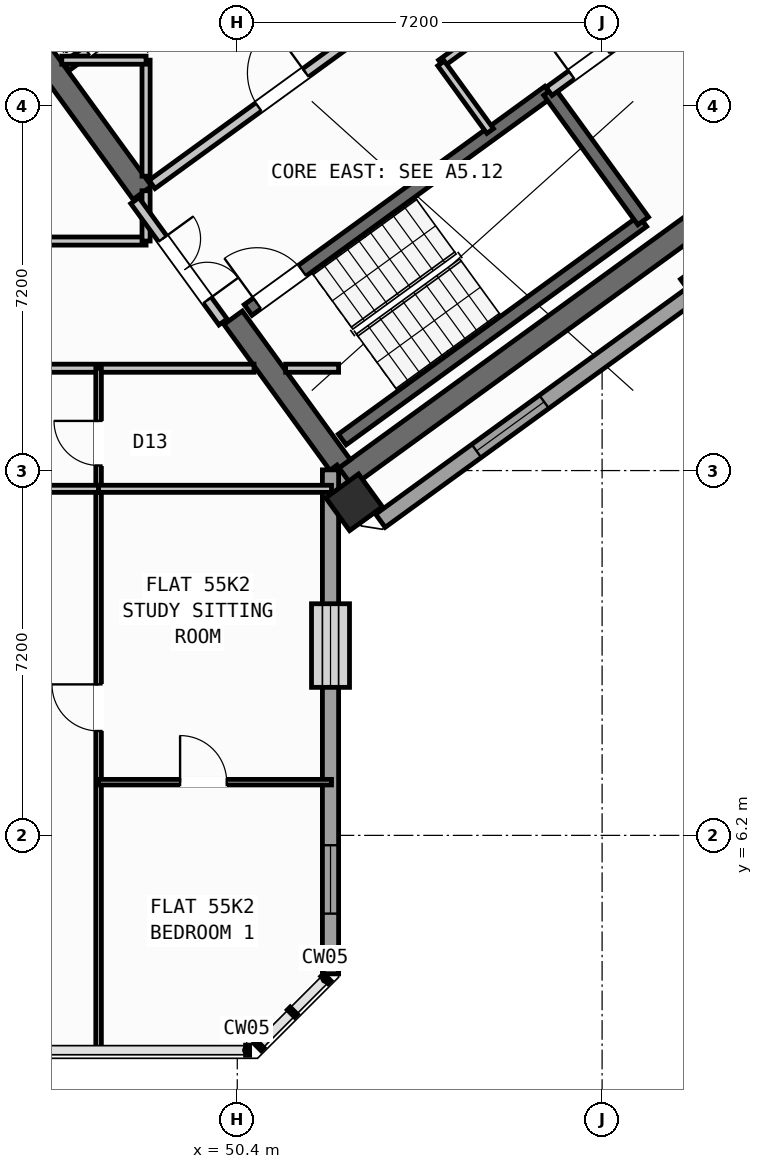
"""IFC4 building model, lengths in metres.
Left out: names, types, materials, properties, quantities, classifications, styles, units other than length and angle.
Written with IfcOpenShell. Run it as: python <this file> out.ifc"""

import sys

from ifc_helpers import new_model, si_unit, direction, frame, frame_2d, origin, origin_2d, place, context, subcontext, project, spatial, rectangle, hollow_rectangle, extrude, source, transform, mapped, element, fill, save


model = new_model("IFC4")
c1 = context("Model", 3, precision=1e-05, world=origin(), true_north=direction((0.0, 1.0)))
c2 = subcontext(c1, "Body", "Model", "MODEL_VIEW")
j1 = project(units=[si_unit("LENGTHUNIT", "METRE"), si_unit("PLANEANGLEUNIT", "RADIAN")], contexts=[c1])
p1 = place(None, origin())
s1 = spatial("IfcSite", under=j1, at=p1, CompositionType="ELEMENT")
p2 = place(p1, origin())
s2 = spatial("IfcBuilding", under=s1, at=p2, CompositionType="ELEMENT")
p3 = place(p2, frame((0.0, 0.0, 218.4)))
s3 = spatial("IfcBuildingStorey", under=s2, at=p3, CompositionType="ELEMENT", Elevation=218.4)
p4 = place(p3, frame((52.399, 13.169, 0.0), z_axis=(0.0, 0.0, 1.0), x_axis=(0.809022352778, 0.587777877013, 0.0)))
e1 = element("IfcWall", 1, at=p4, inside=s3, PredefinedType="SHEAR", context=c2, shape_type="SweptSolid", body=[
    extrude(rectangle(XDim=12.24, YDim=0.45, at=frame_2d((6.12, 0.0))), origin(), (0.0, 0.0, 1.0), 3.35),
])
p5 = place(p3, frame((52.449, 13.483, 0.0), z_axis=(0.0, 0.0, 1.0), x_axis=(-0.587819244441, 0.808992296542, 0.0)))
e2 = element("IfcWall", 2, at=p5, inside=s3, PredefinedType="SHEAR", context=c2, shape_type="SweptSolid", body=[
    extrude(rectangle(XDim=3.625, YDim=0.45, at=frame_2d((1.812, 0.0))), origin(), (0.0, 0.0, 1.0), 3.35),
])
p6 = place(p3, frame((48.526, 18.884, 0.0), z_axis=(0.0, 0.0, 1.0), x_axis=(-0.587774812919, 0.809024578921, 0.0)))
e3 = element("IfcWall", 3, at=p6, inside=s3, PredefinedType="SHEAR", context=c2, shape_type="SweptSolid", body=[
    extrude(rectangle(XDim=6.475, YDim=0.45, at=frame_2d((3.238, 0.0))), origin(), (0.0, 0.0, 1.0), 3.35),
])
m1 = source(origin(), c2, "Body", "SweptSolid", [
    extrude(hollow_rectangle(XDim=0.8, YDim=0.8, WallThickness=0.032, at=origin_2d()), origin(), (0.0, 0.0, 1.0), 3.6),
])
p7 = place(p3, frame((52.705, 12.773, 0.0), z_axis=(0.0, 0.0, 1.0), x_axis=(0.809016994375, 0.587785252292, 0.0)))
e4 = element("IfcColumn", 4, at=p7, inside=s3, PredefinedType="COLUMN", context=c2, shape_type="MappedRepresentation", body=[
    mapped(m1, transform((0.0, 0.0, 0.0), scale=1.0)),
])
p8 = place(p3, frame((67.454, 22.747, 0.0), z_axis=(0.0, 0.0, 1.0), x_axis=(-0.809021120468, -0.587779573171, 0.0)))
e5 = element("IfcWall", 5, at=p8, inside=s3, PredefinedType="STANDARD", context=c2, shape_type="SweptSolid", body=[
    extrude(rectangle(XDim=17.588, YDim=0.32, at=frame_2d((8.794, 0.0))), origin(), (0.0, 0.0, 1.0), 3.35),
])
p9 = place(p8, frame((1.624, 0.0, 0.0)))
e6 = element("IfcOpeningElement", 6, at=p9, cuts=e5, PredefinedType="OPENING", context=c2, shape_type="SweptSolid", body=[
    extrude(rectangle(XDim=1.05, YDim=2.15, at=frame_2d((0.525, 1.075))), frame((0.0, 0.17, 0.0), z_axis=(0.0, -1.0, 0.0), x_axis=(1.0, 0.0, 0.0)), (0.0, 0.0, 1.0), 0.34),
])
p10 = place(p8, frame((8.344, 0.0, 0.9)))
e7 = element("IfcOpeningElement", 7, at=p10, cuts=e5, PredefinedType="OPENING", context=c2, shape_type="SweptSolid", body=[
    extrude(rectangle(XDim=1.65, YDim=1.45, at=frame_2d((0.825, 0.725))), frame((0.0, 0.17, 0.0), z_axis=(0.0, -1.0, 0.0), x_axis=(1.0, 0.0, 0.0)), (0.0, 0.0, 1.0), 0.34),
])
p11 = place(p8, frame((13.594, 0.0, 0.9)))
e8 = element("IfcOpeningElement", 8, at=p11, cuts=e5, PredefinedType="OPENING", context=c2, shape_type="SweptSolid", body=[
    extrude(rectangle(XDim=1.65, YDim=1.45, at=frame_2d((0.825, 0.725))), frame((0.0, 0.17, 0.0), z_axis=(0.0, -1.0, 0.0), x_axis=(1.0, 0.0, 0.0)), (0.0, 0.0, 1.0), 0.34),
])
p12 = place(p3, frame((52.937, 12.455, 0.0), z_axis=(0.0, 0.0, 1.0), x_axis=(-0.587706324018, 0.809074333241, 0.0)))
e9 = element("IfcWall", 9, at=p12, inside=s3, PredefinedType="STANDARD", context=c2, shape_type="SweptSolid", body=[
    extrude(rectangle(XDim=1.186, YDim=0.32, at=frame_2d((0.593, 0.0))), origin(), (0.0, 0.0, 1.0), 3.35),
])
p13 = place(p3, frame((52.24, 13.414, 0.0), z_axis=(0.0, 0.0, 1.0), x_axis=(0.0, -1.0, 0.0)))
e10 = element("IfcWall", 10, at=p13, inside=s3, PredefinedType="STANDARD", context=c2, shape_type="SweptSolid", body=[
    extrude(rectangle(XDim=9.948, YDim=0.32, at=frame_2d((4.974, 0.0))), origin(), (0.0, 0.0, 1.0), 3.35),
])
p14 = place(p13, frame((2.643, 0.0, 0.9)))
e11 = element("IfcOpeningElement", 11, at=p14, cuts=e10, PredefinedType="OPENING", context=c2, shape_type="SweptSolid", body=[
    extrude(rectangle(XDim=1.65, YDim=1.45, at=frame_2d((0.825, 0.725))), frame((0.0, 0.17, 0.0), z_axis=(0.0, -1.0, 0.0), x_axis=(1.0, 0.0, 0.0)), (0.0, 0.0, 1.0), 0.34),
])
p15 = place(p13, frame((7.408, 0.0, 0.9)))
e12 = element("IfcOpeningElement", 12, at=p15, cuts=e10, PredefinedType="OPENING", context=c2, shape_type="SweptSolid", body=[
    extrude(rectangle(XDim=1.35, YDim=1.45, at=frame_2d((0.675, 0.725))), frame((0.0, 0.17, 0.0), z_axis=(0.0, -1.0, 0.0), x_axis=(1.0, 0.0, 0.0)), (0.0, 0.0, 1.0), 0.34),
])
p16 = place(p3, frame((52.472, 14.013, 0.0), z_axis=(0.0, 0.0, 1.0), x_axis=(0.809028366311, 0.587769599847, 0.0)))
e13 = element("IfcWall", 13, at=p16, inside=s3, PredefinedType="SHEAR", context=c2, shape_type="SweptSolid", body=[
    extrude(rectangle(XDim=7.33, YDim=0.26, at=frame_2d((3.665, 0.0))), origin(), (0.0, 0.0, 1.0), 3.35),
])
p17 = place(p3, frame((50.615, 16.57, 0.0), z_axis=(0.0, 0.0, 1.0), x_axis=(0.809028366311, 0.587769599847, 0.0)))
e14 = element("IfcWall", 14, at=p17, inside=s3, PredefinedType="SHEAR", context=c2, shape_type="SweptSolid", body=[
    extrude(rectangle(XDim=7.33, YDim=0.26, at=frame_2d((3.665, 0.0))), origin(), (0.0, 0.0, 1.0), 3.35),
])
p18 = place(p17, frame((0.22, 0.0, 0.0)))
e15 = element("IfcOpeningElement", 15, at=p18, cuts=e14, PredefinedType="OPENING", context=c2, shape_type="SweptSolid", body=[
    extrude(rectangle(XDim=1.1, YDim=2.1, at=frame_2d((0.55, 1.05))), frame((0.0, 0.14, 0.0), z_axis=(0.0, -1.0, 0.0), x_axis=(1.0, 0.0, 0.0)), (0.0, 0.0, 1.0), 0.28),
])
p19 = place(p3, frame((58.41, 18.327, 0.0), z_axis=(0.0, 0.0, 1.0), x_axis=(-0.58776738483, 0.809029975545, 0.0)))
e16 = element("IfcWall", 16, at=p19, inside=s3, PredefinedType="SHEAR", context=c2, shape_type="SweptSolid", body=[
    extrude(rectangle(XDim=3.16, YDim=0.26, at=frame_2d((1.58, 0.0))), origin(), (0.0, 0.0, 1.0), 3.35),
])
p20 = place(p3, frame((47.025, 21.378, 0.0), z_axis=(0.0, 0.0, 1.0), x_axis=(0.809052869724, 0.587735870941, 0.0)))
e17 = element("IfcWall", 17, at=p20, inside=s3, PredefinedType="STANDARD", context=c2, shape_type="SweptSolid", body=[
    extrude(rectangle(XDim=3.498, YDim=0.2, at=frame_2d((1.749, 0.0))), origin(), (0.0, 0.0, 1.0), 3.34),
])
p21 = place(p20, frame((0.508, 0.0, 0.0)))
e18 = element("IfcOpeningElement", 18, at=p21, cuts=e17, PredefinedType="OPENING", context=c2, shape_type="SweptSolid", body=[
    extrude(rectangle(XDim=1.3, YDim=2.2, at=frame_2d((0.65, 1.1))), frame((0.0, 0.11, 0.0), z_axis=(0.0, -1.0, 0.0), x_axis=(1.0, 0.0, 0.0)), (0.0, 0.0, 1.0), 0.22),
])
p22 = place(p3, frame((48.718, 19.048, 0.0), z_axis=(0.0, 0.0, 1.0), x_axis=(0.809017261719, 0.587784884325, 0.0)))
e19 = element("IfcWall", 19, at=p22, inside=s3, PredefinedType="STANDARD", context=c2, shape_type="SweptSolid", body=[
    extrude(rectangle(XDim=5.818, YDim=0.2, at=frame_2d((2.909, 0.0))), origin(), (0.0, 0.0, 1.0), 3.34),
])
p23 = place(p22, frame((2.598, 0.0, 0.0)))
e20 = element("IfcOpeningElement", 20, at=p23, cuts=e19, PredefinedType="OPENING", context=c2, shape_type="SweptSolid", body=[
    extrude(rectangle(XDim=1.15, YDim=2.1, at=frame_2d((0.575, 1.05))), frame((0.0, 0.11, 0.0), z_axis=(0.0, -1.0, 0.0), x_axis=(1.0, 0.0, 0.0)), (0.0, 0.0, 1.0), 0.22),
])
p24 = place(p3, frame((56.553, 20.884, 0.0), z_axis=(0.0, 0.0, 1.0), x_axis=(0.809041669066, 0.587751288995, 0.0)))
e21 = element("IfcWall", 21, at=p24, inside=s3, PredefinedType="STANDARD", context=c2, shape_type="SweptSolid", body=[
    extrude(rectangle(XDim=3.868, YDim=0.2, at=frame_2d((1.934, 0.0))), origin(), (0.0, 0.0, 1.0), 3.34),
])
p25 = place(p24, frame((0.55, 0.0, 0.0)))
e22 = element("IfcOpeningElement", 22, at=p25, cuts=e21, PredefinedType="OPENING", context=c2, shape_type="SweptSolid", body=[
    extrude(rectangle(XDim=0.86, YDim=2.05, at=frame_2d((0.43, 1.025))), frame((0.0, 0.11, 0.0), z_axis=(0.0, -1.0, 0.0), x_axis=(1.0, 0.0, 0.0)), (0.0, 0.0, 1.0), 0.22),
])
p26 = place(p3, frame((54.421, 21.436, 0.0), z_axis=(0.0, 0.0, 1.0), x_axis=(0.809013710463, 0.587789772183, 0.0)))
e23 = element("IfcWall", 23, at=p26, inside=s3, PredefinedType="PARTITIONING", context=c2, shape_type="SweptSolid", body=[
    extrude(rectangle(XDim=5.36, YDim=0.16, at=frame_2d((2.68, 0.0))), origin(), (0.0, 0.0, 1.0), 3.34),
])
p27 = place(p26, frame((1.4, 0.0, 0.0)))
e24 = element("IfcOpeningElement", 24, at=p27, cuts=e23, PredefinedType="OPENING", context=c2, shape_type="SweptSolid", body=[
    extrude(rectangle(XDim=0.86, YDim=2.05, at=frame_2d((0.43, 1.025))), frame((0.0, 0.09, 0.0), z_axis=(0.0, -1.0, 0.0), x_axis=(1.0, 0.0, 0.0)), (0.0, 0.0, 1.0), 0.18),
])
p28 = place(p3, frame((55.391, 20.102, 0.0), z_axis=(0.0, 0.0, 1.0), x_axis=(-0.58778447739, 0.809017557374, 0.0)))
e25 = element("IfcWall", 25, at=p28, inside=s3, PredefinedType="PARTITIONING", context=c2, shape_type="SweptSolid", body=[
    extrude(rectangle(XDim=1.65, YDim=0.16, at=frame_2d((0.825, 0.0))), origin(), (0.0, 0.0, 1.0), 3.34),
])
p29 = place(p3, frame((35.178, 15.42, 0.0), z_axis=(0.0, 0.0, 1.0), x_axis=(1.0, 0.0, 0.0)))
e26 = element("IfcWall", 26, at=p29, inside=s3, PredefinedType="PARTITIONING", context=c2, shape_type="SweptSolid", body=[
    extrude(rectangle(XDim=15.552, YDim=0.16, at=frame_2d((7.776, 0.0))), origin(), (0.0, 0.0, 1.0), 3.34),
])
p30 = place(p29, frame((0.733, 0.0, 0.0)))
e27 = element("IfcOpeningElement", 27, at=p30, cuts=e26, PredefinedType="OPENING", context=c2, shape_type="SweptSolid", body=[
    extrude(rectangle(XDim=1.0, YDim=2.1, at=frame_2d((0.5, 1.05))), frame((0.0, 0.09, 0.0), z_axis=(0.0, -1.0, 0.0), x_axis=(1.0, 0.0, 0.0)), (0.0, 0.0, 1.0), 0.18),
])
p31 = place(p29, frame((9.153, 0.0, 0.0)))
e28 = element("IfcOpeningElement", 28, at=p31, cuts=e26, PredefinedType="OPENING", context=c2, shape_type="SweptSolid", body=[
    extrude(rectangle(XDim=1.0, YDim=2.1, at=frame_2d((0.5, 1.05))), frame((0.0, 0.09, 0.0), z_axis=(0.0, -1.0, 0.0), x_axis=(1.0, 0.0, 0.0)), (0.0, 0.0, 1.0), 0.18),
])
p32 = place(p3, frame((51.354, 15.42, 0.0), z_axis=(0.0, 0.0, 1.0), x_axis=(1.0, 0.0, 0.0)))
e29 = element("IfcWall", 29, at=p32, inside=s3, PredefinedType="PARTITIONING", context=c2, shape_type="SweptSolid", body=[
    extrude(rectangle(XDim=1.046, YDim=0.16, at=frame_2d((0.523, 0.0))), origin(), (0.0, 0.0, 1.0), 3.34),
])
p33 = place(p3, frame((38.65, 17.93, 0.0), z_axis=(0.0, 0.0, 1.0), x_axis=(1.0, 0.0, 0.0)))
e30 = element("IfcWall", 30, at=p33, inside=s3, PredefinedType="PARTITIONING", context=c2, shape_type="SweptSolid", body=[
    extrude(rectangle(XDim=9.95, YDim=0.16, at=frame_2d((4.975, 0.0))), origin(), (0.0, 0.0, 1.0), 3.34),
])
p34 = place(p33, frame((4.475, 0.0, 0.0)))
e31 = element("IfcOpeningElement", 31, at=p34, cuts=e30, PredefinedType="OPENING", context=c2, shape_type="SweptSolid", body=[
    extrude(rectangle(XDim=1.0, YDim=2.1, at=frame_2d((0.5, 1.05))), frame((0.0, 0.09, 0.0), z_axis=(0.0, -1.0, 0.0), x_axis=(1.0, 0.0, 0.0)), (0.0, 0.0, 1.0), 0.18),
])
p35 = place(p3, frame((48.6, 17.93, 0.0), z_axis=(0.0, 0.0, 1.0), x_axis=(0.0, 1.0, 0.0)))
e32 = element("IfcWall", 32, at=p35, inside=s3, PredefinedType="PARTITIONING", context=c2, shape_type="SweptSolid", body=[
    extrude(rectangle(XDim=0.993, YDim=0.16, at=frame_2d((0.496, 0.0))), origin(), (0.0, 0.0, 1.0), 3.34),
])
p36 = place(p3, frame((48.6, 19.21, 0.0), z_axis=(0.0, 0.0, 1.0), x_axis=(0.0, 1.0, 0.0)))
e33 = element("IfcWall", 33, at=p36, inside=s3, PredefinedType="PARTITIONING", context=c2, shape_type="SweptSolid", body=[
    extrude(rectangle(XDim=2.29, YDim=0.16, at=frame_2d((1.145, 0.0))), origin(), (0.0, 0.0, 1.0), 3.34),
])
p37 = place(p3, frame((46.936, 21.5, 0.0), z_axis=(0.0, 0.0, 1.0), x_axis=(1.0, 0.0, 0.0)))
e34 = element("IfcWall", 34, at=p37, inside=s3, PredefinedType="PARTITIONING", context=c2, shape_type="SweptSolid", body=[
    extrude(rectangle(XDim=1.664, YDim=0.16, at=frame_2d((0.832, 0.0))), origin(), (0.0, 0.0, 1.0), 3.34),
])
p38 = place(p3, frame((50.119, 16.333, 0.0), z_axis=(0.0, 0.0, 1.0), x_axis=(-0.587749856981, 0.809042709391, 0.0)))
e35 = element("IfcWall", 35, at=p38, inside=s3, PredefinedType="STANDARD", context=c2, shape_type="SweptSolid", body=[
    extrude(rectangle(XDim=2.96, YDim=0.2, at=frame_2d((1.48, 0.0))), origin(), (0.0, 0.0, 1.0), 3.34),
])
p39 = place(p38, frame((0.53, 0.0, 0.0)))
e36 = element("IfcOpeningElement", 36, at=p39, cuts=e35, PredefinedType="OPENING", context=c2, shape_type="SweptSolid", body=[
    extrude(rectangle(XDim=1.5, YDim=2.15, at=frame_2d((0.75, 1.075))), frame((0.0, 0.11, 0.0), z_axis=(0.0, -1.0, 0.0), x_axis=(1.0, 0.0, 0.0)), (0.0, 0.0, 1.0), 0.22),
])
p40 = place(p3, frame((47.663, 1.96, 0.0), z_axis=(0.0, 0.0, 1.0), x_axis=(0.0, 1.0, 0.0)))
e37 = element("IfcWall", 37, at=p40, inside=s3, PredefinedType="PARTITIONING", context=c2, shape_type="SweptSolid", body=[
    extrude(rectangle(XDim=13.46, YDim=0.11, at=frame_2d((6.73, 0.0))), origin(), (0.0, 0.0, 1.0), 3.34),
])
p41 = place(p40, frame((6.3, 0.0, 0.0)))
e38 = element("IfcOpeningElement", 38, at=p41, cuts=e37, PredefinedType="OPENING", context=c2, shape_type="SweptSolid", body=[
    extrude(rectangle(XDim=0.92, YDim=2.08, at=frame_2d((0.46, 1.04))), frame((0.0, 0.065, 0.0), z_axis=(0.0, -1.0, 0.0), x_axis=(1.0, 0.0, 0.0)), (0.0, 0.0, 1.0), 0.13),
])
p42 = place(p40, frame((11.54, 0.0, 0.0)))
e39 = element("IfcOpeningElement", 39, at=p42, cuts=e37, PredefinedType="OPENING", context=c2, shape_type="SweptSolid", body=[
    extrude(rectangle(XDim=0.88, YDim=2.08, at=frame_2d((0.44, 1.04))), frame((0.0, 0.065, 0.0), z_axis=(0.0, -1.0, 0.0), x_axis=(1.0, 0.0, 0.0)), (0.0, 0.0, 1.0), 0.13),
])
p43 = place(p3, frame((41.95, 13.04, 0.0), z_axis=(0.0, 0.0, 1.0), x_axis=(1.0, 0.0, 0.0)))
e40 = element("IfcWall", 40, at=p43, inside=s3, PredefinedType="PLUMBINGWALL", context=c2, shape_type="SweptSolid", body=[
    extrude(rectangle(XDim=5.713, YDim=0.14, at=frame_2d((2.856, 0.0))), origin(), (0.0, 0.0, 1.0), 3.34),
])
p44 = place(p43, frame((2.396, 0.0, 0.0)))
e41 = element("IfcOpeningElement", 41, at=p44, cuts=e40, PredefinedType="OPENING", context=c2, shape_type="SweptSolid", body=[
    extrude(rectangle(XDim=0.92, YDim=2.08, at=frame_2d((0.46, 1.04))), frame((0.0, 0.08, 0.0), z_axis=(0.0, -1.0, 0.0), x_axis=(1.0, 0.0, 0.0)), (0.0, 0.0, 1.0), 0.16),
])
p45 = place(p3, frame((47.663, 13.04, 0.0), z_axis=(0.0, 0.0, 1.0), x_axis=(1.0, 0.0, 0.0)))
e42 = element("IfcWall", 42, at=p45, inside=s3, PredefinedType="PLUMBINGWALL", context=c2, shape_type="SweptSolid", body=[
    extrude(rectangle(XDim=4.597, YDim=0.14, at=frame_2d((2.298, 0.0))), origin(), (0.0, 0.0, 1.0), 2.525),
])
p46 = place(p3, frame((47.663, 7.25, 0.0), z_axis=(0.0, 0.0, 1.0), x_axis=(1.0, 0.0, 0.0)))
e43 = element("IfcWall", 43, at=p46, inside=s3, PredefinedType="PARTITIONING", context=c2, shape_type="SweptSolid", body=[
    extrude(rectangle(XDim=4.597, YDim=0.11, at=frame_2d((2.298, 0.0))), origin(), (0.0, 0.0, 1.0), 3.34),
])
p47 = place(p46, frame((1.608, 0.0, 0.0)))
e44 = element("IfcOpeningElement", 44, at=p47, cuts=e43, PredefinedType="OPENING", context=c2, shape_type="SweptSolid", body=[
    extrude(rectangle(XDim=0.92, YDim=2.08, at=frame_2d((0.46, 1.04))), frame((0.0, 0.065, 0.0), z_axis=(0.0, -1.0, 0.0), x_axis=(1.0, 0.0, 0.0)), (0.0, 0.0, 1.0), 0.13),
])
p48 = place(p3, frame((64.709, 20.938, 0.0), z_axis=(0.0, 0.0, 1.0), x_axis=(-0.587781191743, 0.809019944521, 0.0)))
e45 = element("IfcWall", 45, at=p48, inside=s3, PredefinedType="PARTITIONING", context=c2, shape_type="SweptSolid", body=[
    extrude(rectangle(XDim=11.6, YDim=0.16, at=frame_2d((5.8, 0.0))), origin(), (0.0, 0.0, 1.0), 3.34),
])
m2 = source(origin(), c2, "Body", "SweptSolid", [
    extrude(rectangle(XDim=1.65, YDim=1.45, at=frame_2d((0.825, 0.725))), frame((0.0, 0.03, 0.0), z_axis=(0.0, -1.0, 0.0), x_axis=(1.0, 0.0, 0.0)), (0.0, 0.0, 1.0), 0.06),
])
p49 = place(p11, origin())
e46 = element("IfcWindow", 46, at=p49, inside=s3, PartitioningType="SINGLE_PANEL", PredefinedType="WINDOW", context=c2, shape_type="MappedRepresentation", body=[
    mapped(m2, transform((0.0, 0.0, 0.0), scale=1.0)),
])
fill(e8, e46)
p50 = place(p14, origin())
e47 = element("IfcWindow", 47, at=p50, inside=s3, PartitioningType="SINGLE_PANEL", PredefinedType="WINDOW", context=c2, shape_type="MappedRepresentation", body=[
    mapped(m2, transform((0.0, 0.0, 0.0), scale=1.0)),
])
fill(e11, e47)
m3 = source(origin(), c2, "Body", "SweptSolid", [
    extrude(rectangle(XDim=1.35, YDim=1.45, at=frame_2d((0.675, 0.725))), frame((0.0, 0.03, 0.0), z_axis=(0.0, -1.0, 0.0), x_axis=(1.0, 0.0, 0.0)), (0.0, 0.0, 1.0), 0.06),
])
p51 = place(p15, origin())
e48 = element("IfcWindow", 48, at=p51, inside=s3, PartitioningType="SINGLE_PANEL", PredefinedType="WINDOW", context=c2, shape_type="MappedRepresentation", body=[
    mapped(m3, transform((0.0, 0.0, 0.0), scale=1.0)),
])
fill(e12, e48)
m4 = source(origin(), c2, "Body", "SweptSolid", [
    extrude(rectangle(XDim=1.1, YDim=2.1, at=frame_2d((0.55, 1.05))), frame((0.0, 0.025, 0.0), z_axis=(0.0, -1.0, 0.0), x_axis=(1.0, 0.0, 0.0)), (0.0, 0.0, 1.0), 0.05),
])
p52 = place(p18, origin())
e49 = element("IfcDoor", 49, at=p52, inside=s3, OperationType="SINGLE_SWING_LEFT", PredefinedType="DOOR", context=c2, shape_type="MappedRepresentation", body=[
    mapped(m4, transform((0.0, 0.0, 0.0), scale=1.0)),
])
fill(e15, e49)
m5 = source(origin(), c2, "Body", "SweptSolid", [
    extrude(rectangle(XDim=1.15, YDim=2.1, at=frame_2d((0.575, 1.05))), frame((0.0, 0.025, 0.0), z_axis=(0.0, -1.0, 0.0), x_axis=(1.0, 0.0, 0.0)), (0.0, 0.0, 1.0), 0.05),
])
p53 = place(p23, origin())
e50 = element("IfcDoor", 50, at=p53, inside=s3, OperationType="SINGLE_SWING_RIGHT", PredefinedType="DOOR", context=c2, shape_type="MappedRepresentation", body=[
    mapped(m5, transform((0.0, 0.0, 0.0), scale=1.0)),
])
fill(e20, e50)
m6 = source(origin(), c2, "Body", "SweptSolid", [
    extrude(rectangle(XDim=1.3, YDim=2.2, at=frame_2d((0.65, 1.1))), frame((0.0, 0.025, 0.0), z_axis=(0.0, -1.0, 0.0), x_axis=(1.0, 0.0, 0.0)), (0.0, 0.0, 1.0), 0.05),
])
p54 = place(p21, origin())
e51 = element("IfcDoor", 51, at=p54, inside=s3, OperationType="DOUBLE_DOOR_SLIDING", PredefinedType="DOOR", context=c2, shape_type="MappedRepresentation", body=[
    mapped(m6, transform((0.0, 0.0, 0.0), scale=1.0)),
])
fill(e18, e51)
m7 = source(origin(), c2, "Body", "SweptSolid", [
    extrude(rectangle(XDim=0.86, YDim=2.05, at=frame_2d((0.43, 1.025))), frame((0.0, 0.025, 0.0), z_axis=(0.0, -1.0, 0.0), x_axis=(1.0, 0.0, 0.0)), (0.0, 0.0, 1.0), 0.05),
])
p55 = place(p25, origin())
e52 = element("IfcDoor", 52, at=p55, inside=s3, OperationType="SINGLE_SWING_LEFT", PredefinedType="DOOR", context=c2, shape_type="MappedRepresentation", body=[
    mapped(m7, transform((0.0, 0.0, 0.0), scale=1.0)),
])
fill(e22, e52)
m8 = source(origin(), c2, "Body", "SweptSolid", [
    extrude(rectangle(XDim=1.5, YDim=2.15, at=frame_2d((0.75, 1.075))), frame((0.0, 0.025, 0.0), z_axis=(0.0, -1.0, 0.0), x_axis=(1.0, 0.0, 0.0)), (0.0, 0.0, 1.0), 0.05),
])
p56 = place(p39, frame((1.5, 0.0, 0.0), z_axis=(0.0, 0.0, 1.0), x_axis=(-1.0, 0.0, 0.0)))
e53 = element("IfcDoor", 53, at=p56, inside=s3, OperationType="DOUBLE_DOOR_SINGLE_SWING", PredefinedType="DOOR", context=c2, shape_type="MappedRepresentation", body=[
    mapped(m8, transform((0.0, 0.0, 0.0), scale=1.0)),
])
fill(e36, e53)
m9 = source(origin(), c2, "Body", "SweptSolid", [
    extrude(rectangle(XDim=0.92, YDim=2.08, at=frame_2d((0.46, 1.04))), frame((0.0, 0.025, 0.0), z_axis=(0.0, -1.0, 0.0), x_axis=(1.0, 0.0, 0.0)), (0.0, 0.0, 1.0), 0.05),
])
p57 = place(p41, origin())
e54 = element("IfcDoor", 54, at=p57, inside=s3, OperationType="SINGLE_SWING_RIGHT", PredefinedType="DOOR", context=c2, shape_type="MappedRepresentation", body=[
    mapped(m9, transform((0.0, 0.0, 0.0), scale=1.0)),
])
fill(e38, e54)
p58 = place(p47, origin())
e55 = element("IfcDoor", 55, at=p58, inside=s3, OperationType="SINGLE_SWING_LEFT", PredefinedType="DOOR", context=c2, shape_type="MappedRepresentation", body=[
    mapped(m9, transform((0.0, 0.0, 0.0), scale=1.0)),
])
fill(e44, e55)
m10 = source(origin(), c2, "Body", "SweptSolid", [
    extrude(rectangle(XDim=0.88, YDim=2.08, at=frame_2d((0.44, 1.04))), frame((0.0, 0.025, 0.0), z_axis=(0.0, -1.0, 0.0), x_axis=(1.0, 0.0, 0.0)), (0.0, 0.0, 1.0), 0.05),
])
p59 = place(p42, origin())
e56 = element("IfcDoor", 56, at=p59, inside=s3, OperationType="SINGLE_SWING_RIGHT", PredefinedType="DOOR", context=c2, shape_type="MappedRepresentation", body=[
    mapped(m10, transform((0.0, 0.0, 0.0), scale=1.0)),
])
fill(e39, e56)
save(model, sys.argv[1])
